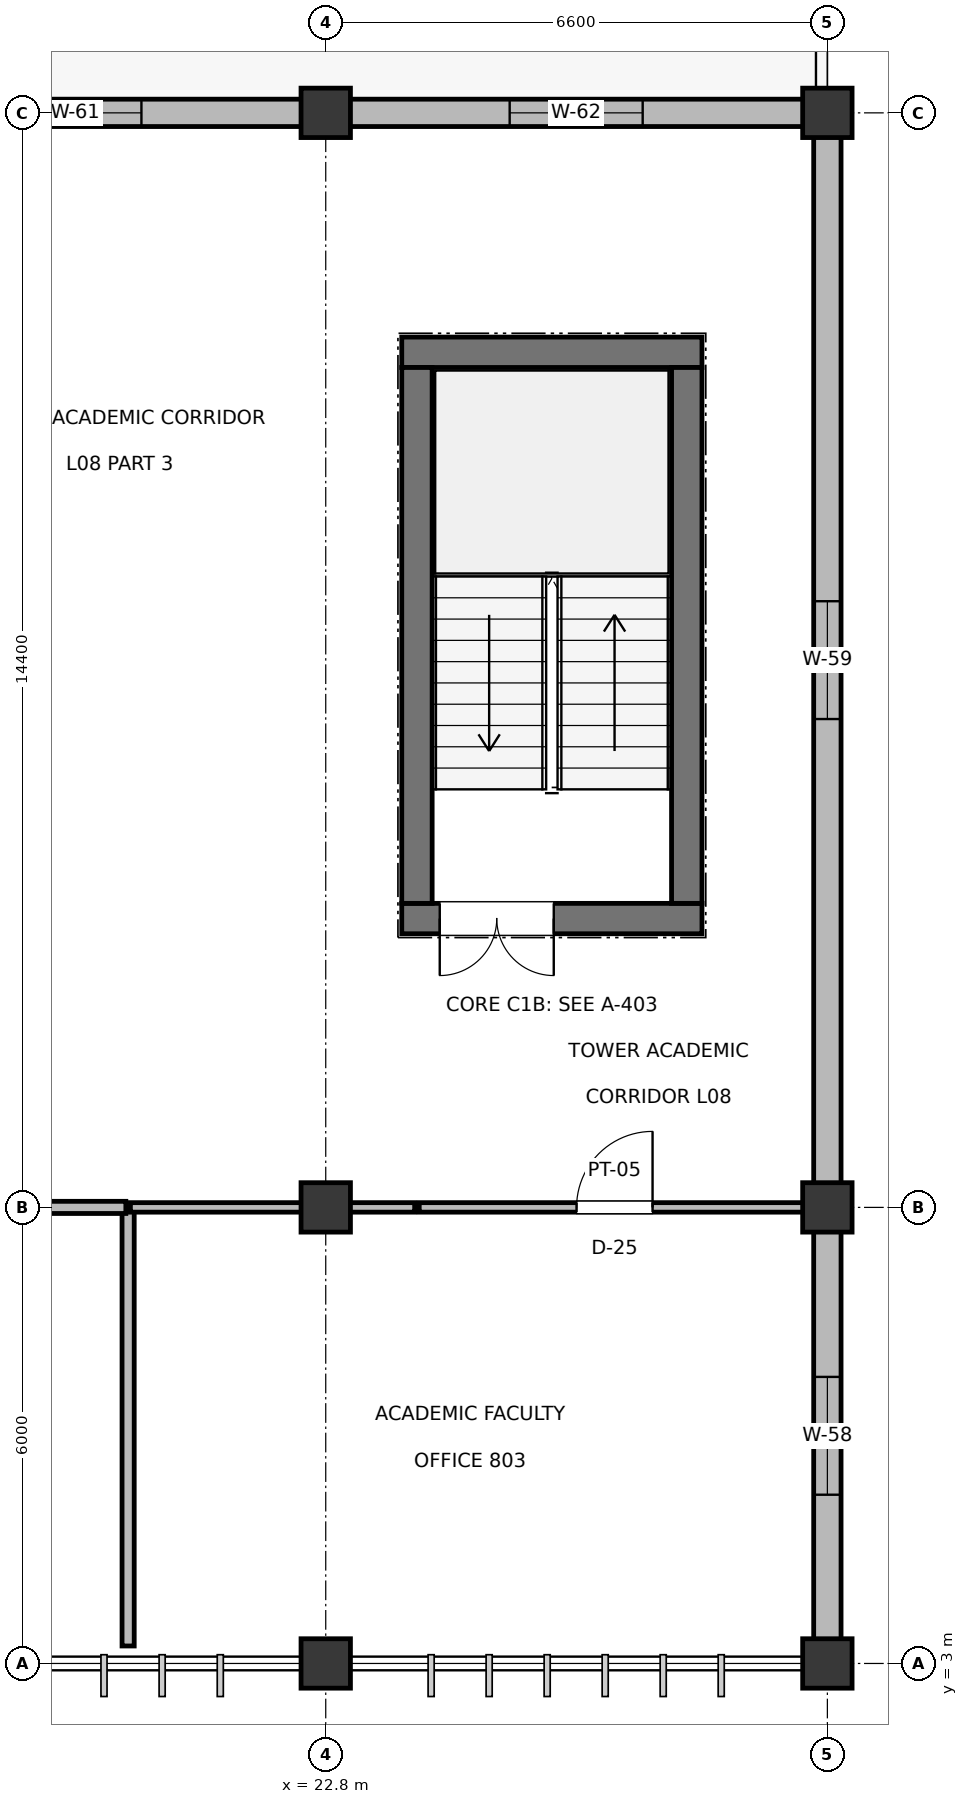
"""IFC4 building model, lengths in metres.
Left out: names, types, materials, properties, quantities, classifications, styles, units other than length and angle.
Written with IfcOpenShell. Run it as: python <this file> out.ifc"""

import sys

from ifc_helpers import new_model, si_unit, direction, frame, frame_2d, origin, origin_2d, place, context, subcontext, project, spatial, rectangle, extrude, element, fill, save


model = new_model("IFC4")
c1 = context("Model", 3, precision=1e-05, world=origin(), true_north=direction((0.0, 1.0)))
c2 = subcontext(c1, "Body", "Model", "MODEL_VIEW")
j1 = project(units=[si_unit("LENGTHUNIT", "METRE"), si_unit("PLANEANGLEUNIT", "RADIAN")], contexts=[c1])
p1 = place(None, origin())
s1 = spatial("IfcSite", under=j1, at=p1, CompositionType="ELEMENT")
p2 = place(p1, origin())
s2 = spatial("IfcBuilding", under=s1, at=p2, CompositionType="ELEMENT")
p3 = place(p2, frame((0.0, 0.0, 36.8)))
s3 = spatial("IfcBuildingStorey", under=s2, at=p3, CompositionType="ELEMENT", Elevation=36.8)
for number, where, z_axis, x_axis in (
    (1, (22.8, 3.0, 0.0), (0.0, 0.0, 1.0), (1.0, 0.0, 0.0)),
    (2, (22.8, 9.0, 0.0), (0.0, 0.0, 1.0), (1.0, 0.0, 0.0)),
    (3, (22.8, 23.4, 0.0), (0.0, 0.0, 1.0), (1.0, 0.0, 0.0)),
    (4, (29.4, 3.0, 0.0), (0.0, 0.0, 1.0), (1.0, 0.0, 0.0)),
    (5, (29.4, 9.0, 0.0), (0.0, 0.0, 1.0), (1.0, 0.0, 0.0)),
    (6, (29.4, 23.4, 0.0), (0.0, 0.0, 1.0), (1.0, 0.0, 0.0)),
):
    element("IfcColumn", number, at=place(p3, frame(where, z_axis=z_axis, x_axis=x_axis)), inside=s3, PredefinedType="COLUMN", context=c2, shape_type="SweptSolid", body=[
        extrude(rectangle(XDim=0.65, YDim=0.65, at=origin_2d()), origin(), (0.0, 0.0, 1.0), 3.8),
    ])
p4 = place(p3, frame((29.4, 3.305, 0.0), z_axis=(0.0, 0.0, 1.0), x_axis=(0.0, 1.0, 0.0)))
e7 = element("IfcWall", 7, at=p4, inside=s3, PredefinedType="SOLIDWALL", context=c2, shape_type="SweptSolid", body=[
    extrude(rectangle(XDim=5.38, YDim=0.36, at=frame_2d((2.69, 0.0))), origin(), (0.0, 0.0, 1.0), 2.925),
])
p5 = place(p4, frame((1.915, 0.0, 0.9)))
e8 = element("IfcOpeningElement", 8, at=p5, cuts=e7, PredefinedType="OPENING", context=c2, shape_type="SweptSolid", body=[
    extrude(rectangle(XDim=1.55, YDim=1.35, at=frame_2d((0.775, 0.675))), frame((0.0, 0.19, 0.0), z_axis=(0.0, -1.0, 0.0), x_axis=(1.0, 0.0, 0.0)), (0.0, 0.0, 1.0), 0.38),
])
p6 = place(p3, frame((29.4, 9.315, 0.0), z_axis=(0.0, 0.0, 1.0), x_axis=(0.0, 1.0, 0.0)))
e9 = element("IfcWall", 9, at=p6, inside=s3, PredefinedType="SOLIDWALL", context=c2, shape_type="SweptSolid", body=[
    extrude(rectangle(XDim=13.77, YDim=0.36, at=frame_2d((6.885, 0.0))), origin(), (0.0, 0.0, 1.0), 2.725),
])
p7 = place(p6, frame((6.11, 0.0, 0.9)))
e10 = element("IfcOpeningElement", 10, at=p7, cuts=e9, PredefinedType="OPENING", context=c2, shape_type="SweptSolid", body=[
    extrude(rectangle(XDim=1.55, YDim=1.55, at=frame_2d((0.775, 0.775))), frame((0.0, 0.19, 0.0), z_axis=(0.0, -1.0, 0.0), x_axis=(1.0, 0.0, 0.0)), (0.0, 0.0, 1.0), 0.38),
])
p8 = place(p3, frame((16.505, 23.4, 0.0), z_axis=(0.0, 0.0, 1.0), x_axis=(1.0, 0.0, 0.0)))
e11 = element("IfcWall", 11, at=p8, inside=s3, PredefinedType="SOLIDWALL", context=c2, shape_type="SweptSolid", body=[
    extrude(rectangle(XDim=5.99, YDim=0.36, at=frame_2d((2.995, 0.0))), origin(), (0.0, 0.0, 1.0), 2.615),
])
p9 = place(p8, frame((2.12, 0.0, 0.9)))
e12 = element("IfcOpeningElement", 12, at=p9, cuts=e11, PredefinedType="OPENING", context=c2, shape_type="SweptSolid", body=[
    extrude(rectangle(XDim=1.75, YDim=1.15, at=frame_2d((0.875, 0.575))), frame((0.0, 0.19, 0.0), z_axis=(0.0, -1.0, 0.0), x_axis=(1.0, 0.0, 0.0)), (0.0, 0.0, 1.0), 0.38),
])
p10 = place(p3, frame((23.105, 23.4, 0.0), z_axis=(0.0, 0.0, 1.0), x_axis=(1.0, 0.0, 0.0)))
e13 = element("IfcWall", 13, at=p10, inside=s3, PredefinedType="SOLIDWALL", context=c2, shape_type="SweptSolid", body=[
    extrude(rectangle(XDim=5.98, YDim=0.36, at=frame_2d((2.99, 0.0))), origin(), (0.0, 0.0, 1.0), 2.825),
])
p11 = place(p10, frame((2.115, 0.0, 0.9)))
e14 = element("IfcOpeningElement", 14, at=p11, cuts=e13, PredefinedType="OPENING", context=c2, shape_type="SweptSolid", body=[
    extrude(rectangle(XDim=1.75, YDim=1.35, at=frame_2d((0.875, 0.675))), frame((0.0, 0.19, 0.0), z_axis=(0.0, -1.0, 0.0), x_axis=(1.0, 0.0, 0.0)), (0.0, 0.0, 1.0), 0.38),
])
p12 = place(p3, frame((23.8, 12.8, 0.0), z_axis=(0.0, 0.0, 1.0), x_axis=(1.0, 0.0, 0.0)))
e15 = element("IfcWall", 15, at=p12, inside=s3, PredefinedType="SHEAR", context=c2, shape_type="SweptSolid", body=[
    extrude(rectangle(XDim=3.95, YDim=0.4, at=frame_2d((1.975, 0.0))), origin(), (0.0, 0.0, 1.0), 3.58),
])
p13 = place(p12, frame((0.5, 0.0, 0.0)))
e16 = element("IfcOpeningElement", 16, at=p13, cuts=e15, PredefinedType="OPENING", context=c2, shape_type="SweptSolid", body=[
    extrude(rectangle(XDim=1.5, YDim=2.2, at=frame_2d((0.75, 1.1))), frame((0.0, 0.21, 0.0), z_axis=(0.0, -1.0, 0.0), x_axis=(1.0, 0.0, 0.0)), (0.0, 0.0, 1.0), 0.42),
])
p14 = place(p3, frame((23.8, 20.25, 0.0), z_axis=(0.0, 0.0, 1.0), x_axis=(1.0, 0.0, 0.0)))
e17 = element("IfcWall", 17, at=p14, inside=s3, PredefinedType="SHEAR", context=c2, shape_type="SweptSolid", body=[
    extrude(rectangle(XDim=3.95, YDim=0.4, at=frame_2d((1.975, 0.0))), origin(), (0.0, 0.0, 1.0), 3.58),
])
for number, where, z_axis, x_axis in (
    (18, (24.0, 13.0, 0.0), (0.0, 0.0, 1.0), (0.0, 1.0, 0.0)),
    (19, (27.55, 13.0, 0.0), (0.0, 0.0, 1.0), (0.0, 1.0, 0.0)),
):
    element("IfcWall", number, at=place(p3, frame(where, z_axis=z_axis, x_axis=x_axis)), inside=s3, PredefinedType="SHEAR", context=c2, shape_type="SweptSolid", body=[
        extrude(rectangle(XDim=7.05, YDim=0.4, at=frame_2d((3.525, 0.0))), origin(), (0.0, 0.0, 1.0), 3.58),
    ])
p15 = place(p3, frame((20.2, 3.23, 0.0), z_axis=(0.0, 0.0, 1.0), x_axis=(0.0, 1.0, 0.0)))
e20 = element("IfcWall", 20, at=p15, inside=s3, PredefinedType="PARTITIONING", context=c2, shape_type="SweptSolid", body=[
    extrude(rectangle(XDim=5.74, YDim=0.16, at=frame_2d((2.87, 0.0))), origin(), (0.0, 0.0, 1.0), 2.615),
])
p16 = place(p3, frame((11.83, 9.0, 0.0), z_axis=(0.0, 0.0, 1.0), x_axis=(1.0, 0.0, 0.0)))
e21 = element("IfcWall", 21, at=p16, inside=s3, PredefinedType="PARTITIONING", context=c2, shape_type="SweptSolid", body=[
    extrude(rectangle(XDim=8.34, YDim=0.16, at=frame_2d((4.17, 0.0))), origin(), (0.0, 0.0, 1.0), 2.615),
])
p17 = place(p16, frame((2.68, 0.0, 0.0)))
e22 = element("IfcOpeningElement", 22, at=p17, cuts=e21, PredefinedType="OPENING", context=c2, shape_type="SweptSolid", body=[
    extrude(rectangle(XDim=1.18, YDim=2.2, at=frame_2d((0.59, 1.1))), frame((0.0, 0.09, 0.0), z_axis=(0.0, -1.0, 0.0), x_axis=(1.0, 0.0, 0.0)), (0.0, 0.0, 1.0), 0.18),
])
p18 = place(p3, frame((24.03, 9.0, 0.0), z_axis=(0.0, 0.0, 1.0), x_axis=(1.0, 0.0, 0.0)))
e23 = element("IfcWall", 23, at=p18, inside=s3, PredefinedType="PARTITIONING", context=c2, shape_type="SweptSolid", body=[
    extrude(rectangle(XDim=5.14, YDim=0.125, at=frame_2d((2.57, 0.0))), origin(), (0.0, 0.0, 1.0), 2.825),
])
p19 = place(p18, frame((2.07, 0.0, 0.0)))
e24 = element("IfcOpeningElement", 24, at=p19, cuts=e23, PredefinedType="OPENING", context=c2, shape_type="SweptSolid", body=[
    extrude(rectangle(XDim=1.0, YDim=2.15, at=frame_2d((0.5, 1.075))), frame((0.0, 0.073, 0.0), z_axis=(0.0, -1.0, 0.0), x_axis=(1.0, 0.0, 0.0)), (0.0, 0.0, 1.0), 0.145),
])
p20 = place(p3, frame((20.23, 9.0, 0.0), z_axis=(0.0, 0.0, 1.0), x_axis=(1.0, 0.0, 0.0)))
e25 = element("IfcWall", 25, at=p20, inside=s3, PredefinedType="PARTITIONING", context=c2, shape_type="SweptSolid", body=[
    extrude(rectangle(XDim=3.74, YDim=0.125, at=frame_2d((1.87, 0.0))), origin(), (0.0, 0.0, 1.0), 2.615),
])
p21 = place(p5, frame((1.55, 0.0, 0.0), z_axis=(0.0, 0.0, 1.0), x_axis=(-1.0, 0.0, 0.0)))
e26 = element("IfcWindow", 26, at=p21, inside=s3, PartitioningType="DOUBLE_PANEL_VERTICAL", PredefinedType="WINDOW", context=c2, shape_type="SweptSolid", body=[
    extrude(rectangle(XDim=1.55, YDim=1.35, at=frame_2d((0.775, 0.675))), frame((0.0, 0.03, 0.0), z_axis=(0.0, -1.0, 0.0), x_axis=(1.0, 0.0, 0.0)), (0.0, 0.0, 1.0), 0.06),
])
fill(e8, e26)
p22 = place(p7, frame((1.55, 0.0, 0.0), z_axis=(0.0, 0.0, 1.0), x_axis=(-1.0, 0.0, 0.0)))
e27 = element("IfcWindow", 27, at=p22, inside=s3, PartitioningType="DOUBLE_PANEL_VERTICAL", PredefinedType="WINDOW", context=c2, shape_type="SweptSolid", body=[
    extrude(rectangle(XDim=1.55, YDim=1.55, at=frame_2d((0.775, 0.775))), frame((0.0, 0.03, 0.0), z_axis=(0.0, -1.0, 0.0), x_axis=(1.0, 0.0, 0.0)), (0.0, 0.0, 1.0), 0.06),
])
fill(e10, e27)
p23 = place(p9, origin())
e28 = element("IfcWindow", 28, at=p23, inside=s3, PartitioningType="DOUBLE_PANEL_VERTICAL", PredefinedType="WINDOW", context=c2, shape_type="SweptSolid", body=[
    extrude(rectangle(XDim=1.75, YDim=1.15, at=frame_2d((0.875, 0.575))), frame((0.0, 0.03, 0.0), z_axis=(0.0, -1.0, 0.0), x_axis=(1.0, 0.0, 0.0)), (0.0, 0.0, 1.0), 0.06),
])
fill(e12, e28)
p24 = place(p11, origin())
e29 = element("IfcWindow", 29, at=p24, inside=s3, PartitioningType="DOUBLE_PANEL_VERTICAL", PredefinedType="WINDOW", context=c2, shape_type="SweptSolid", body=[
    extrude(rectangle(XDim=1.75, YDim=1.35, at=frame_2d((0.875, 0.675))), frame((0.0, 0.03, 0.0), z_axis=(0.0, -1.0, 0.0), x_axis=(1.0, 0.0, 0.0)), (0.0, 0.0, 1.0), 0.06),
])
fill(e14, e29)
p25 = place(p13, frame((1.5, 0.0, 0.0), z_axis=(0.0, 0.0, 1.0), x_axis=(-1.0, 0.0, 0.0)))
e30 = element("IfcDoor", 30, at=p25, inside=s3, OperationType="DOUBLE_DOOR_SINGLE_SWING", PredefinedType="DOOR", context=c2, shape_type="SweptSolid", body=[
    extrude(rectangle(XDim=1.5, YDim=2.2, at=frame_2d((0.75, 1.1))), frame((0.0, 0.025, 0.0), z_axis=(0.0, -1.0, 0.0), x_axis=(1.0, 0.0, 0.0)), (0.0, 0.0, 1.0), 0.05),
])
fill(e16, e30)
p26 = place(p19, origin())
e31 = element("IfcDoor", 31, at=p26, inside=s3, OperationType="SINGLE_SWING_RIGHT", PredefinedType="DOOR", context=c2, shape_type="SweptSolid", body=[
    extrude(rectangle(XDim=1.0, YDim=2.15, at=frame_2d((0.5, 1.075))), frame((0.0, 0.025, 0.0), z_axis=(0.0, -1.0, 0.0), x_axis=(1.0, 0.0, 0.0)), (0.0, 0.0, 1.0), 0.05),
])
fill(e24, e31)
save(model, sys.argv[1])
